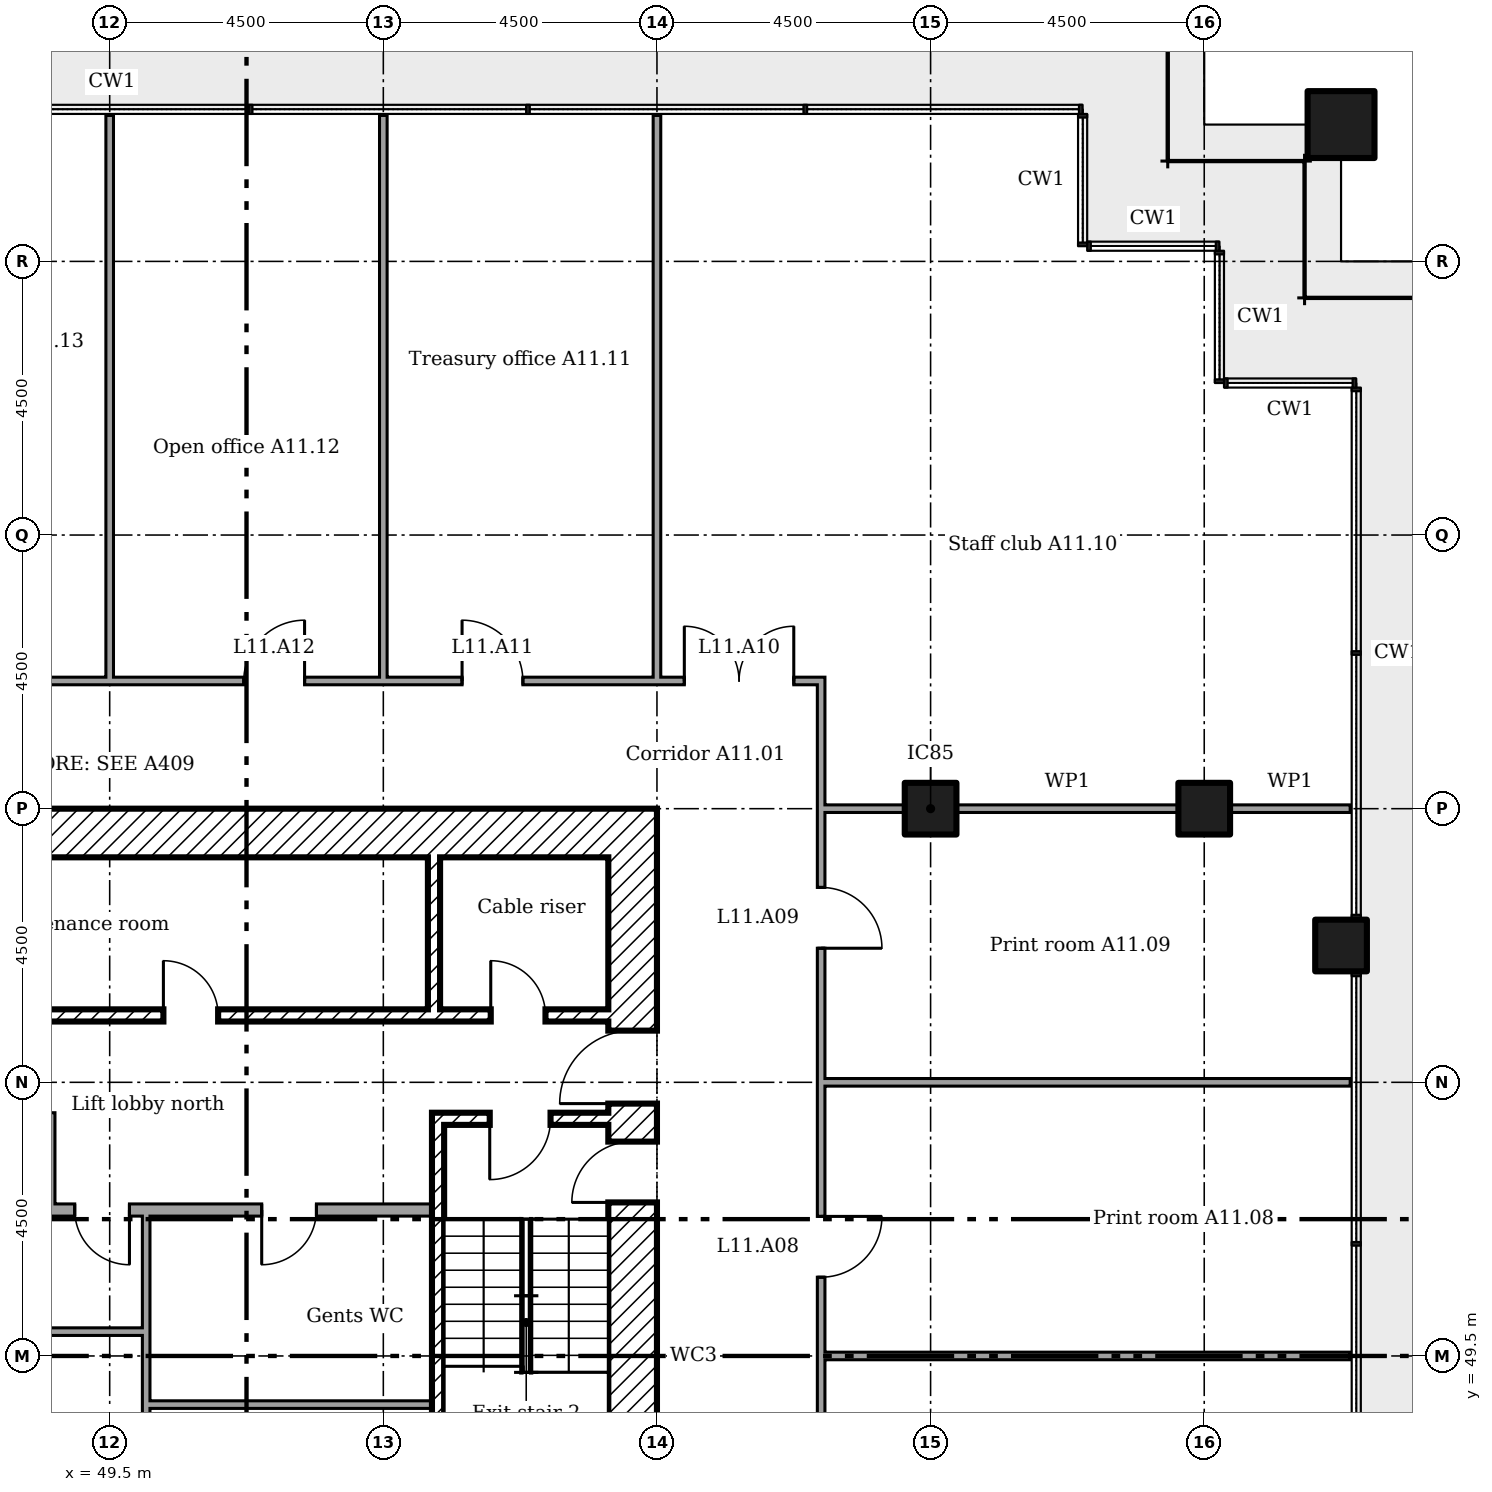
"""IFC4 building model, lengths in metres.
Left out: names, types, materials, properties, quantities, classifications, styles, units other than length and angle.
Written with IfcOpenShell. Run it as: python <this file> out.ifc"""

import sys

from ifc_helpers import new_model, si_unit, direction, frame, frame_2d, origin, origin_2d, place, context, subcontext, project, spatial, rectangle, extrude, element, fill, save


model = new_model("IFC4")
c1 = context("Model", 3, precision=1e-05, world=origin(), true_north=direction((0.0, 1.0)))
c2 = subcontext(c1, "Body", "Model", "MODEL_VIEW")
j1 = project(units=[si_unit("LENGTHUNIT", "METRE"), si_unit("PLANEANGLEUNIT", "RADIAN")], contexts=[c1])
p1 = place(None, origin())
s1 = spatial("IfcSite", under=j1, at=p1, CompositionType="ELEMENT")
p2 = place(p1, origin())
s2 = spatial("IfcBuilding", under=s1, at=p2, CompositionType="ELEMENT")
p3 = place(p2, frame((0.0, 0.0, 51.0)))
s3 = spatial("IfcBuildingStorey", under=s2, at=p3, CompositionType="ELEMENT", Elevation=51.0)
p4 = place(p3, frame((69.75, 69.75, 0.0)))
e1 = element("IfcColumn", 1, at=p4, inside=s3, PredefinedType="COLUMN", context=c2, shape_type="SweptSolid", body=[
    extrude(rectangle(XDim=1.1, YDim=1.1, at=origin_2d()), origin(), (0.0, 0.0, 1.0), 3.6),
])
for number, where in (
    (2, (63.0, 58.5, 0.0)),
    (3, (67.5, 58.5, 0.0)),
    (4, (69.75, 56.25, 0.0)),
):
    element("IfcColumn", number, at=place(p3, frame(where)), inside=s3, PredefinedType="COLUMN", context=c2, shape_type="SweptSolid", body=[
        extrude(rectangle(XDim=0.85, YDim=0.85, at=origin_2d()), origin(), (0.0, 0.0, 1.0), 3.6),
    ])
p5 = place(p3, frame((58.1, 40.5, 0.0), z_axis=(0.0, 0.0, 1.0), x_axis=(0.0, 1.0, 0.0)))
e5 = element("IfcWall", 5, at=p5, inside=s3, PredefinedType="SHEAR", context=c2, shape_type="SweptSolid", body=[
    extrude(rectangle(XDim=18.0, YDim=0.8, at=frame_2d((9.0, 0.0))), origin(), (0.0, 0.0, 1.0), 3.35),
])
p6 = place(p5, frame((13.15, 0.0, 0.0)))
e6 = element("IfcOpeningElement", 6, at=p6, cuts=e5, PredefinedType="OPENING", context=c2, shape_type="SweptSolid", body=[
    extrude(rectangle(XDim=1.2, YDim=2.1, at=frame_2d((0.6, 1.05))), frame((0.0, 0.41, 0.0), z_axis=(0.0, -1.0, 0.0), x_axis=(1.0, 0.0, 0.0)), (0.0, 0.0, 1.0), 0.82),
])
p7 = place(p5, frame((3.9, 0.0, 0.0)))
e7 = element("IfcOpeningElement", 7, at=p7, cuts=e5, PredefinedType="OPENING", context=c2, shape_type="SweptSolid", body=[
    extrude(rectangle(XDim=1.8, YDim=2.1, at=frame_2d((0.9, 1.05))), frame((0.0, 0.41, 0.0), z_axis=(0.0, -1.0, 0.0), x_axis=(1.0, 0.0, 0.0)), (0.0, 0.0, 1.0), 0.82),
])
p8 = place(p5, frame((11.525, 0.0, 0.0)))
e8 = element("IfcOpeningElement", 8, at=p8, cuts=e5, PredefinedType="OPENING", context=c2, shape_type="SweptSolid", body=[
    extrude(rectangle(XDim=1.0, YDim=2.1, at=frame_2d((0.5, 1.05))), frame((0.0, 0.41, 0.0), z_axis=(0.0, -1.0, 0.0), x_axis=(1.0, 0.0, 0.0)), (0.0, 0.0, 1.0), 0.82),
])
p9 = place(p3, frame((41.3, 58.1, 0.0)))
e9 = element("IfcWall", 9, at=p9, inside=s3, PredefinedType="SHEAR", context=c2, shape_type="SweptSolid", body=[
    extrude(rectangle(XDim=16.4, YDim=0.8, at=frame_2d((8.2, 0.0))), origin(), (0.0, 0.0, 1.0), 3.35),
])
p10 = place(p3, frame((54.833, 57.7, 0.0), z_axis=(0.0, 0.0, 1.0), x_axis=(0.0, -1.0, 0.0)))
e10 = element("IfcWall", 10, at=p10, inside=s3, PredefinedType="SHEAR", context=c2, shape_type="SweptSolid", body=[
    extrude(rectangle(XDim=2.5, YDim=0.2, at=frame_2d((1.25, 0.0))), origin(), (0.0, 0.0, 1.0), 3.35),
])
p11 = place(p3, frame((48.5, 51.9, 0.0), z_axis=(0.0, 0.0, 1.0), x_axis=(0.0, 1.0, 0.0)))
e11 = element("IfcWall", 11, at=p11, inside=s3, PredefinedType="PARTITIONING", context=c2, shape_type="SweptSolid", body=[
    extrude(rectangle(XDim=1.6, YDim=0.2, at=frame_2d((0.8, 0.0))), origin(), (0.0, 0.0, 1.0), 3.35),
])
p12 = place(p3, frame((46.933, 55.1, 0.0)))
e12 = element("IfcWall", 12, at=p12, inside=s3, PredefinedType="SHEAR", context=c2, shape_type="SweptSolid", body=[
    extrude(rectangle(XDim=10.767, YDim=0.2, at=frame_2d((5.383, 0.0))), origin(), (0.0, 0.0, 1.0), 3.35),
])
p13 = place(p12, frame((8.833, 0.0, 0.0)))
e13 = element("IfcOpeningElement", 13, at=p13, cuts=e12, PredefinedType="OPENING", context=c2, shape_type="SweptSolid", body=[
    extrude(rectangle(XDim=0.9, YDim=2.1, at=frame_2d((0.45, 1.05))), frame((0.0, 0.11, 0.0), z_axis=(0.0, -1.0, 0.0), x_axis=(1.0, 0.0, 0.0)), (0.0, 0.0, 1.0), 0.22),
])
p14 = place(p12, frame((3.45, 0.0, 0.0)))
e14 = element("IfcOpeningElement", 14, at=p14, cuts=e12, PredefinedType="OPENING", context=c2, shape_type="SweptSolid", body=[
    extrude(rectangle(XDim=0.9, YDim=2.1, at=frame_2d((0.45, 1.05))), frame((0.0, 0.11, 0.0), z_axis=(0.0, -1.0, 0.0), x_axis=(1.0, 0.0, 0.0)), (0.0, 0.0, 1.0), 0.22),
])
p15 = place(p3, frame((54.8, 53.4, 0.0)))
e15 = element("IfcWall", 15, at=p15, inside=s3, PredefinedType="SHEAR", context=c2, shape_type="SweptSolid", body=[
    extrude(rectangle(XDim=2.9, YDim=0.2, at=frame_2d((1.45, 0.0))), origin(), (0.0, 0.0, 1.0), 3.35),
])
p16 = place(p15, frame((0.95, 0.0, 0.0)))
e16 = element("IfcOpeningElement", 16, at=p16, cuts=e15, PredefinedType="OPENING", context=c2, shape_type="SweptSolid", body=[
    extrude(rectangle(XDim=1.0, YDim=2.1, at=frame_2d((0.5, 1.05))), frame((0.0, 0.11, 0.0), z_axis=(0.0, -1.0, 0.0), x_axis=(1.0, 0.0, 0.0)), (0.0, 0.0, 1.0), 0.22),
])
p17 = place(p3, frame((54.9, 46.8, 0.0), z_axis=(0.0, 0.0, 1.0), x_axis=(0.0, 1.0, 0.0)))
e17 = element("IfcWall", 17, at=p17, inside=s3, PredefinedType="SHEAR", context=c2, shape_type="SweptSolid", body=[
    extrude(rectangle(XDim=6.5, YDim=0.2, at=frame_2d((3.25, 0.0))), origin(), (0.0, 0.0, 1.0), 3.35),
])
p18 = place(p3, frame((44.2, 51.9, 0.0)))
e18 = element("IfcWall", 18, at=p18, inside=s3, PredefinedType="PARTITIONING", context=c2, shape_type="SweptSolid", body=[
    extrude(rectangle(XDim=10.6, YDim=0.2, at=frame_2d((5.3, 0.0))), origin(), (0.0, 0.0, 1.0), 3.35),
])
p19 = place(p18, frame((4.725, 0.0, 0.0)))
e19 = element("IfcOpeningElement", 19, at=p19, cuts=e18, PredefinedType="OPENING", context=c2, shape_type="SweptSolid", body=[
    extrude(rectangle(XDim=0.9, YDim=2.1, at=frame_2d((0.45, 1.05))), frame((0.0, 0.11, 0.0), z_axis=(0.0, -1.0, 0.0), x_axis=(1.0, 0.0, 0.0)), (0.0, 0.0, 1.0), 0.22),
])
p20 = place(p18, frame((7.8, 0.0, 0.0)))
e20 = element("IfcOpeningElement", 20, at=p20, cuts=e18, PredefinedType="OPENING", context=c2, shape_type="SweptSolid", body=[
    extrude(rectangle(XDim=0.9, YDim=2.1, at=frame_2d((0.45, 1.05))), frame((0.0, 0.11, 0.0), z_axis=(0.0, -1.0, 0.0), x_axis=(1.0, 0.0, 0.0)), (0.0, 0.0, 1.0), 0.22),
])
p21 = place(p3, frame((50.1, 46.8, 0.0), z_axis=(0.0, 0.0, 1.0), x_axis=(0.0, 1.0, 0.0)))
e21 = element("IfcWall", 21, at=p21, inside=s3, PredefinedType="PARTITIONING", context=c2, shape_type="SweptSolid", body=[
    extrude(rectangle(XDim=1.962, YDim=0.125, at=frame_2d((0.981, 0.0))), origin(), (0.0, 0.0, 1.0), 3.35),
])
p22 = place(p3, frame((54.8, 48.7, 0.0), z_axis=(0.0, 0.0, 1.0), x_axis=(-1.0, 0.0, 0.0)))
e22 = element("IfcWall", 22, at=p22, inside=s3, PredefinedType="PARTITIONING", context=c2, shape_type="SweptSolid", body=[
    extrude(rectangle(XDim=4.637, YDim=0.125, at=frame_2d((2.319, 0.0))), origin(), (0.0, 0.0, 1.0), 3.35),
])
p23 = place(p3, frame((50.1, 48.7, 0.0), z_axis=(0.0, 0.0, 1.0), x_axis=(0.0, 1.0, 0.0)))
e23 = element("IfcWall", 23, at=p23, inside=s3, PredefinedType="PARTITIONING", context=c2, shape_type="SweptSolid", body=[
    extrude(rectangle(XDim=1.262, YDim=0.125, at=frame_2d((0.631, 0.0))), origin(), (0.0, 0.0, 1.0), 3.35),
])
p24 = place(p3, frame((50.038, 49.9, 0.0), z_axis=(0.0, 0.0, 1.0), x_axis=(-1.0, 0.0, 0.0)))
e24 = element("IfcWall", 24, at=p24, inside=s3, PredefinedType="PARTITIONING", context=c2, shape_type="SweptSolid", body=[
    extrude(rectangle(XDim=5.838, YDim=0.125, at=frame_2d((2.919, 0.0))), origin(), (0.0, 0.0, 1.0), 3.35),
])
p25 = place(p3, frame((50.1, 49.9, 0.0), z_axis=(0.0, 0.0, 1.0), x_axis=(0.0, 1.0, 0.0)))
e25 = element("IfcWall", 25, at=p25, inside=s3, PredefinedType="PARTITIONING", context=c2, shape_type="SweptSolid", body=[
    extrude(rectangle(XDim=1.9, YDim=0.125, at=frame_2d((0.95, 0.0))), origin(), (0.0, 0.0, 1.0), 3.35),
])
for number, where in (
    (26, (61.2, 49.5, 0.0)),
    (27, (61.2, 54.0, 0.0)),
):
    element("IfcWall", number, at=place(p3, frame(where)), inside=s3, PredefinedType="PARTITIONING", context=c2, shape_type="SweptSolid", body=[
        extrude(rectangle(XDim=8.7, YDim=0.125, at=frame_2d((4.35, 0.0))), origin(), (0.0, 0.0, 1.0), 2.766),
    ])
p26 = place(p3, frame((61.2, 58.5, 0.0)))
e28 = element("IfcWall", 28, at=p26, inside=s3, PredefinedType="PARTITIONING", context=c2, shape_type="SweptSolid", body=[
    extrude(rectangle(XDim=1.375, YDim=0.125, at=frame_2d((0.688, 0.0))), origin(), (0.0, 0.0, 1.0), 2.676),
])
p27 = place(p3, frame((63.425, 58.5, 0.0)))
e29 = element("IfcWall", 29, at=p27, inside=s3, PredefinedType="PARTITIONING", context=c2, shape_type="SweptSolid", body=[
    extrude(rectangle(XDim=3.65, YDim=0.125, at=frame_2d((1.825, 0.0))), origin(), (0.0, 0.0, 1.0), 2.676),
])
p28 = place(p3, frame((67.925, 58.5, 0.0)))
e30 = element("IfcWall", 30, at=p28, inside=s3, PredefinedType="PARTITIONING", context=c2, shape_type="SweptSolid", body=[
    extrude(rectangle(XDim=1.975, YDim=0.125, at=frame_2d((0.987, 0.0))), origin(), (0.0, 0.0, 1.0), 2.676),
])
p29 = place(p3, frame((37.738, 60.6, 0.0)))
e31 = element("IfcWall", 31, at=p29, inside=s3, PredefinedType="PARTITIONING", context=c2, shape_type="SweptSolid", body=[
    extrude(rectangle(XDim=23.525, YDim=0.125, at=frame_2d((11.762, 0.0))), origin(), (0.0, 0.0, 1.0), 3.45),
])
p30 = place(p29, frame((21.212, 0.0, 0.0)))
e32 = element("IfcOpeningElement", 32, at=p30, cuts=e31, PredefinedType="OPENING", context=c2, shape_type="SweptSolid", body=[
    extrude(rectangle(XDim=1.8, YDim=2.1, at=frame_2d((0.9, 1.05))), frame((0.0, 0.073, 0.0), z_axis=(0.0, -1.0, 0.0), x_axis=(1.0, 0.0, 0.0)), (0.0, 0.0, 1.0), 0.145),
])
p31 = place(p29, frame((17.558, 0.0, 0.0)))
e33 = element("IfcOpeningElement", 33, at=p31, cuts=e31, PredefinedType="OPENING", context=c2, shape_type="SweptSolid", body=[
    extrude(rectangle(XDim=1.0, YDim=2.1, at=frame_2d((0.5, 1.05))), frame((0.0, 0.073, 0.0), z_axis=(0.0, -1.0, 0.0), x_axis=(1.0, 0.0, 0.0)), (0.0, 0.0, 1.0), 0.145),
])
p32 = place(p29, frame((13.968, 0.0, 0.0)))
e34 = element("IfcOpeningElement", 34, at=p32, cuts=e31, PredefinedType="OPENING", context=c2, shape_type="SweptSolid", body=[
    extrude(rectangle(XDim=1.0, YDim=2.1, at=frame_2d((0.5, 1.05))), frame((0.0, 0.073, 0.0), z_axis=(0.0, -1.0, 0.0), x_axis=(1.0, 0.0, 0.0)), (0.0, 0.0, 1.0), 0.145),
])
p33 = place(p29, frame((9.012, 0.0, 0.0)))
e35 = element("IfcOpeningElement", 35, at=p33, cuts=e31, PredefinedType="OPENING", context=c2, shape_type="SweptSolid", body=[
    extrude(rectangle(XDim=1.0, YDim=2.1, at=frame_2d((0.5, 1.05))), frame((0.0, 0.073, 0.0), z_axis=(0.0, -1.0, 0.0), x_axis=(1.0, 0.0, 0.0)), (0.0, 0.0, 1.0), 0.145),
])
p34 = place(p29, frame((4.058, 0.0, 0.0)))
e36 = element("IfcOpeningElement", 36, at=p34, cuts=e31, PredefinedType="OPENING", context=c2, shape_type="SweptSolid", body=[
    extrude(rectangle(XDim=1.0, YDim=2.1, at=frame_2d((0.5, 1.05))), frame((0.0, 0.073, 0.0), z_axis=(0.0, -1.0, 0.0), x_axis=(1.0, 0.0, 0.0)), (0.0, 0.0, 1.0), 0.145),
])
p35 = place(p29, frame((0.512, 0.0, 0.0)))
e37 = element("IfcOpeningElement", 37, at=p35, cuts=e31, PredefinedType="OPENING", context=c2, shape_type="SweptSolid", body=[
    extrude(rectangle(XDim=1.8, YDim=2.1, at=frame_2d((0.9, 1.05))), frame((0.0, 0.073, 0.0), z_axis=(0.0, -1.0, 0.0), x_axis=(1.0, 0.0, 0.0)), (0.0, 0.0, 1.0), 0.145),
])
for number, where, z_axis, x_axis in (
    (38, (49.5, 60.6, 0.0), (0.0, 0.0, 1.0), (0.0, 1.0, 0.0)),
    (39, (54.0, 60.6, 0.0), (0.0, 0.0, 1.0), (0.0, 1.0, 0.0)),
    (40, (58.5, 60.6, 0.0), (0.0, 0.0, 1.0), (0.0, 1.0, 0.0)),
):
    element("IfcWall", number, at=place(p3, frame(where, z_axis=z_axis, x_axis=x_axis)), inside=s3, PredefinedType="PARTITIONING", context=c2, shape_type="SweptSolid", body=[
        extrude(rectangle(XDim=9.3, YDim=0.125, at=frame_2d((4.65, 0.0))), origin(), (0.0, 0.0, 1.0), 2.766),
    ])
p36 = place(p3, frame((61.2, 38.462, 0.0), z_axis=(0.0, 0.0, 1.0), x_axis=(0.0, 1.0, 0.0)))
e41 = element("IfcWall", 41, at=p36, inside=s3, PredefinedType="PARTITIONING", context=c2, shape_type="SweptSolid", body=[
    extrude(rectangle(XDim=22.075, YDim=0.125, at=frame_2d((11.038, 0.0))), origin(), (0.0, 0.0, 1.0), 3.45),
])
p37 = place(p36, frame((6.038, 0.0, 0.0)))
e42 = element("IfcOpeningElement", 42, at=p37, cuts=e41, PredefinedType="OPENING", context=c2, shape_type="SweptSolid", body=[
    extrude(rectangle(XDim=1.0, YDim=2.1, at=frame_2d((0.5, 1.05))), frame((0.0, 0.073, 0.0), z_axis=(0.0, -1.0, 0.0), x_axis=(1.0, 0.0, 0.0)), (0.0, 0.0, 1.0), 0.145),
])
p38 = place(p36, frame((12.333, 0.0, 0.0)))
e43 = element("IfcOpeningElement", 43, at=p38, cuts=e41, PredefinedType="OPENING", context=c2, shape_type="SweptSolid", body=[
    extrude(rectangle(XDim=1.0, YDim=2.1, at=frame_2d((0.5, 1.05))), frame((0.0, 0.073, 0.0), z_axis=(0.0, -1.0, 0.0), x_axis=(1.0, 0.0, 0.0)), (0.0, 0.0, 1.0), 0.145),
])
p39 = place(p36, frame((17.742, 0.0, 0.0)))
e44 = element("IfcOpeningElement", 44, at=p39, cuts=e41, PredefinedType="OPENING", context=c2, shape_type="SweptSolid", body=[
    extrude(rectangle(XDim=1.0, YDim=2.1, at=frame_2d((0.5, 1.05))), frame((0.0, 0.073, 0.0), z_axis=(0.0, -1.0, 0.0), x_axis=(1.0, 0.0, 0.0)), (0.0, 0.0, 1.0), 0.145),
])
p40 = place(p6, origin())
e45 = element("IfcDoor", 45, at=p40, inside=s3, OperationType="SINGLE_SWING_RIGHT", PredefinedType="DOOR", context=c2, shape_type="SweptSolid", body=[
    extrude(rectangle(XDim=1.2, YDim=2.1, at=frame_2d((0.6, 1.05))), frame((0.0, 0.025, 0.0), z_axis=(0.0, -1.0, 0.0), x_axis=(1.0, 0.0, 0.0)), (0.0, 0.0, 1.0), 0.05),
])
fill(e6, e45)
p41 = place(p16, frame((1.0, 0.0, 0.0), x_axis=(-1.0, 0.0, 0.0)))
e46 = element("IfcDoor", 46, at=p41, inside=s3, OperationType="SINGLE_SWING_LEFT", PredefinedType="DOOR", context=c2, shape_type="SweptSolid", body=[
    extrude(rectangle(XDim=1.0, YDim=2.1, at=frame_2d((0.5, 1.05))), frame((0.0, 0.025, 0.0), z_axis=(0.0, -1.0, 0.0), x_axis=(1.0, 0.0, 0.0)), (0.0, 0.0, 1.0), 0.05),
])
fill(e16, e46)
p42 = place(p8, origin())
e47 = element("IfcDoor", 47, at=p42, inside=s3, OperationType="SINGLE_SWING_RIGHT", PredefinedType="DOOR", context=c2, shape_type="SweptSolid", body=[
    extrude(rectangle(XDim=1.0, YDim=2.1, at=frame_2d((0.5, 1.05))), frame((0.0, 0.025, 0.0), z_axis=(0.0, -1.0, 0.0), x_axis=(1.0, 0.0, 0.0)), (0.0, 0.0, 1.0), 0.05),
])
fill(e8, e47)
p43 = place(p13, origin())
e48 = element("IfcDoor", 48, at=p43, inside=s3, OperationType="SINGLE_SWING_RIGHT", PredefinedType="DOOR", context=c2, shape_type="SweptSolid", body=[
    extrude(rectangle(XDim=0.9, YDim=2.1, at=frame_2d((0.45, 1.05))), frame((0.0, 0.025, 0.0), z_axis=(0.0, -1.0, 0.0), x_axis=(1.0, 0.0, 0.0)), (0.0, 0.0, 1.0), 0.05),
])
fill(e13, e48)
p44 = place(p14, origin())
e49 = element("IfcDoor", 49, at=p44, inside=s3, OperationType="SINGLE_SWING_RIGHT", PredefinedType="DOOR", context=c2, shape_type="SweptSolid", body=[
    extrude(rectangle(XDim=0.9, YDim=2.1, at=frame_2d((0.45, 1.05))), frame((0.0, 0.025, 0.0), z_axis=(0.0, -1.0, 0.0), x_axis=(1.0, 0.0, 0.0)), (0.0, 0.0, 1.0), 0.05),
])
fill(e14, e49)
p45 = place(p19, frame((0.9, 0.0, 0.0), x_axis=(-1.0, 0.0, 0.0)))
e50 = element("IfcDoor", 50, at=p45, inside=s3, OperationType="SINGLE_SWING_RIGHT", PredefinedType="DOOR", context=c2, shape_type="SweptSolid", body=[
    extrude(rectangle(XDim=0.9, YDim=2.1, at=frame_2d((0.45, 1.05))), frame((0.0, 0.025, 0.0), z_axis=(0.0, -1.0, 0.0), x_axis=(1.0, 0.0, 0.0)), (0.0, 0.0, 1.0), 0.05),
])
fill(e19, e50)
p46 = place(p20, frame((0.9, 0.0, 0.0), x_axis=(-1.0, 0.0, 0.0)))
e51 = element("IfcDoor", 51, at=p46, inside=s3, OperationType="SINGLE_SWING_LEFT", PredefinedType="DOOR", context=c2, shape_type="SweptSolid", body=[
    extrude(rectangle(XDim=0.9, YDim=2.1, at=frame_2d((0.45, 1.05))), frame((0.0, 0.025, 0.0), z_axis=(0.0, -1.0, 0.0), x_axis=(1.0, 0.0, 0.0)), (0.0, 0.0, 1.0), 0.05),
])
fill(e20, e51)
p47 = place(p38, frame((1.0, 0.0, 0.0), x_axis=(-1.0, 0.0, 0.0)))
e52 = element("IfcDoor", 52, at=p47, inside=s3, OperationType="SINGLE_SWING_RIGHT", PredefinedType="DOOR", context=c2, shape_type="SweptSolid", body=[
    extrude(rectangle(XDim=1.0, YDim=2.1, at=frame_2d((0.5, 1.05))), frame((0.0, 0.025, 0.0), z_axis=(0.0, -1.0, 0.0), x_axis=(1.0, 0.0, 0.0)), (0.0, 0.0, 1.0), 0.05),
])
fill(e43, e52)
p48 = place(p39, frame((1.0, 0.0, 0.0), x_axis=(-1.0, 0.0, 0.0)))
e53 = element("IfcDoor", 53, at=p48, inside=s3, OperationType="SINGLE_SWING_LEFT", PredefinedType="DOOR", context=c2, shape_type="SweptSolid", body=[
    extrude(rectangle(XDim=1.0, YDim=2.1, at=frame_2d((0.5, 1.05))), frame((0.0, 0.025, 0.0), z_axis=(0.0, -1.0, 0.0), x_axis=(1.0, 0.0, 0.0)), (0.0, 0.0, 1.0), 0.05),
])
fill(e44, e53)
p49 = place(p30, origin())
e54 = element("IfcDoor", 54, at=p49, inside=s3, OperationType="DOUBLE_DOOR_SINGLE_SWING", PredefinedType="DOOR", context=c2, shape_type="SweptSolid", body=[
    extrude(rectangle(XDim=1.8, YDim=2.1, at=frame_2d((0.9, 1.05))), frame((0.0, 0.025, 0.0), z_axis=(0.0, -1.0, 0.0), x_axis=(1.0, 0.0, 0.0)), (0.0, 0.0, 1.0), 0.05),
])
fill(e32, e54)
p50 = place(p31, origin())
e55 = element("IfcDoor", 55, at=p50, inside=s3, OperationType="SINGLE_SWING_RIGHT", PredefinedType="DOOR", context=c2, shape_type="SweptSolid", body=[
    extrude(rectangle(XDim=1.0, YDim=2.1, at=frame_2d((0.5, 1.05))), frame((0.0, 0.025, 0.0), z_axis=(0.0, -1.0, 0.0), x_axis=(1.0, 0.0, 0.0)), (0.0, 0.0, 1.0), 0.05),
])
fill(e33, e55)
p51 = place(p32, origin())
e56 = element("IfcDoor", 56, at=p51, inside=s3, OperationType="SINGLE_SWING_LEFT", PredefinedType="DOOR", context=c2, shape_type="SweptSolid", body=[
    extrude(rectangle(XDim=1.0, YDim=2.1, at=frame_2d((0.5, 1.05))), frame((0.0, 0.025, 0.0), z_axis=(0.0, -1.0, 0.0), x_axis=(1.0, 0.0, 0.0)), (0.0, 0.0, 1.0), 0.05),
])
fill(e34, e56)
save(model, sys.argv[1])
